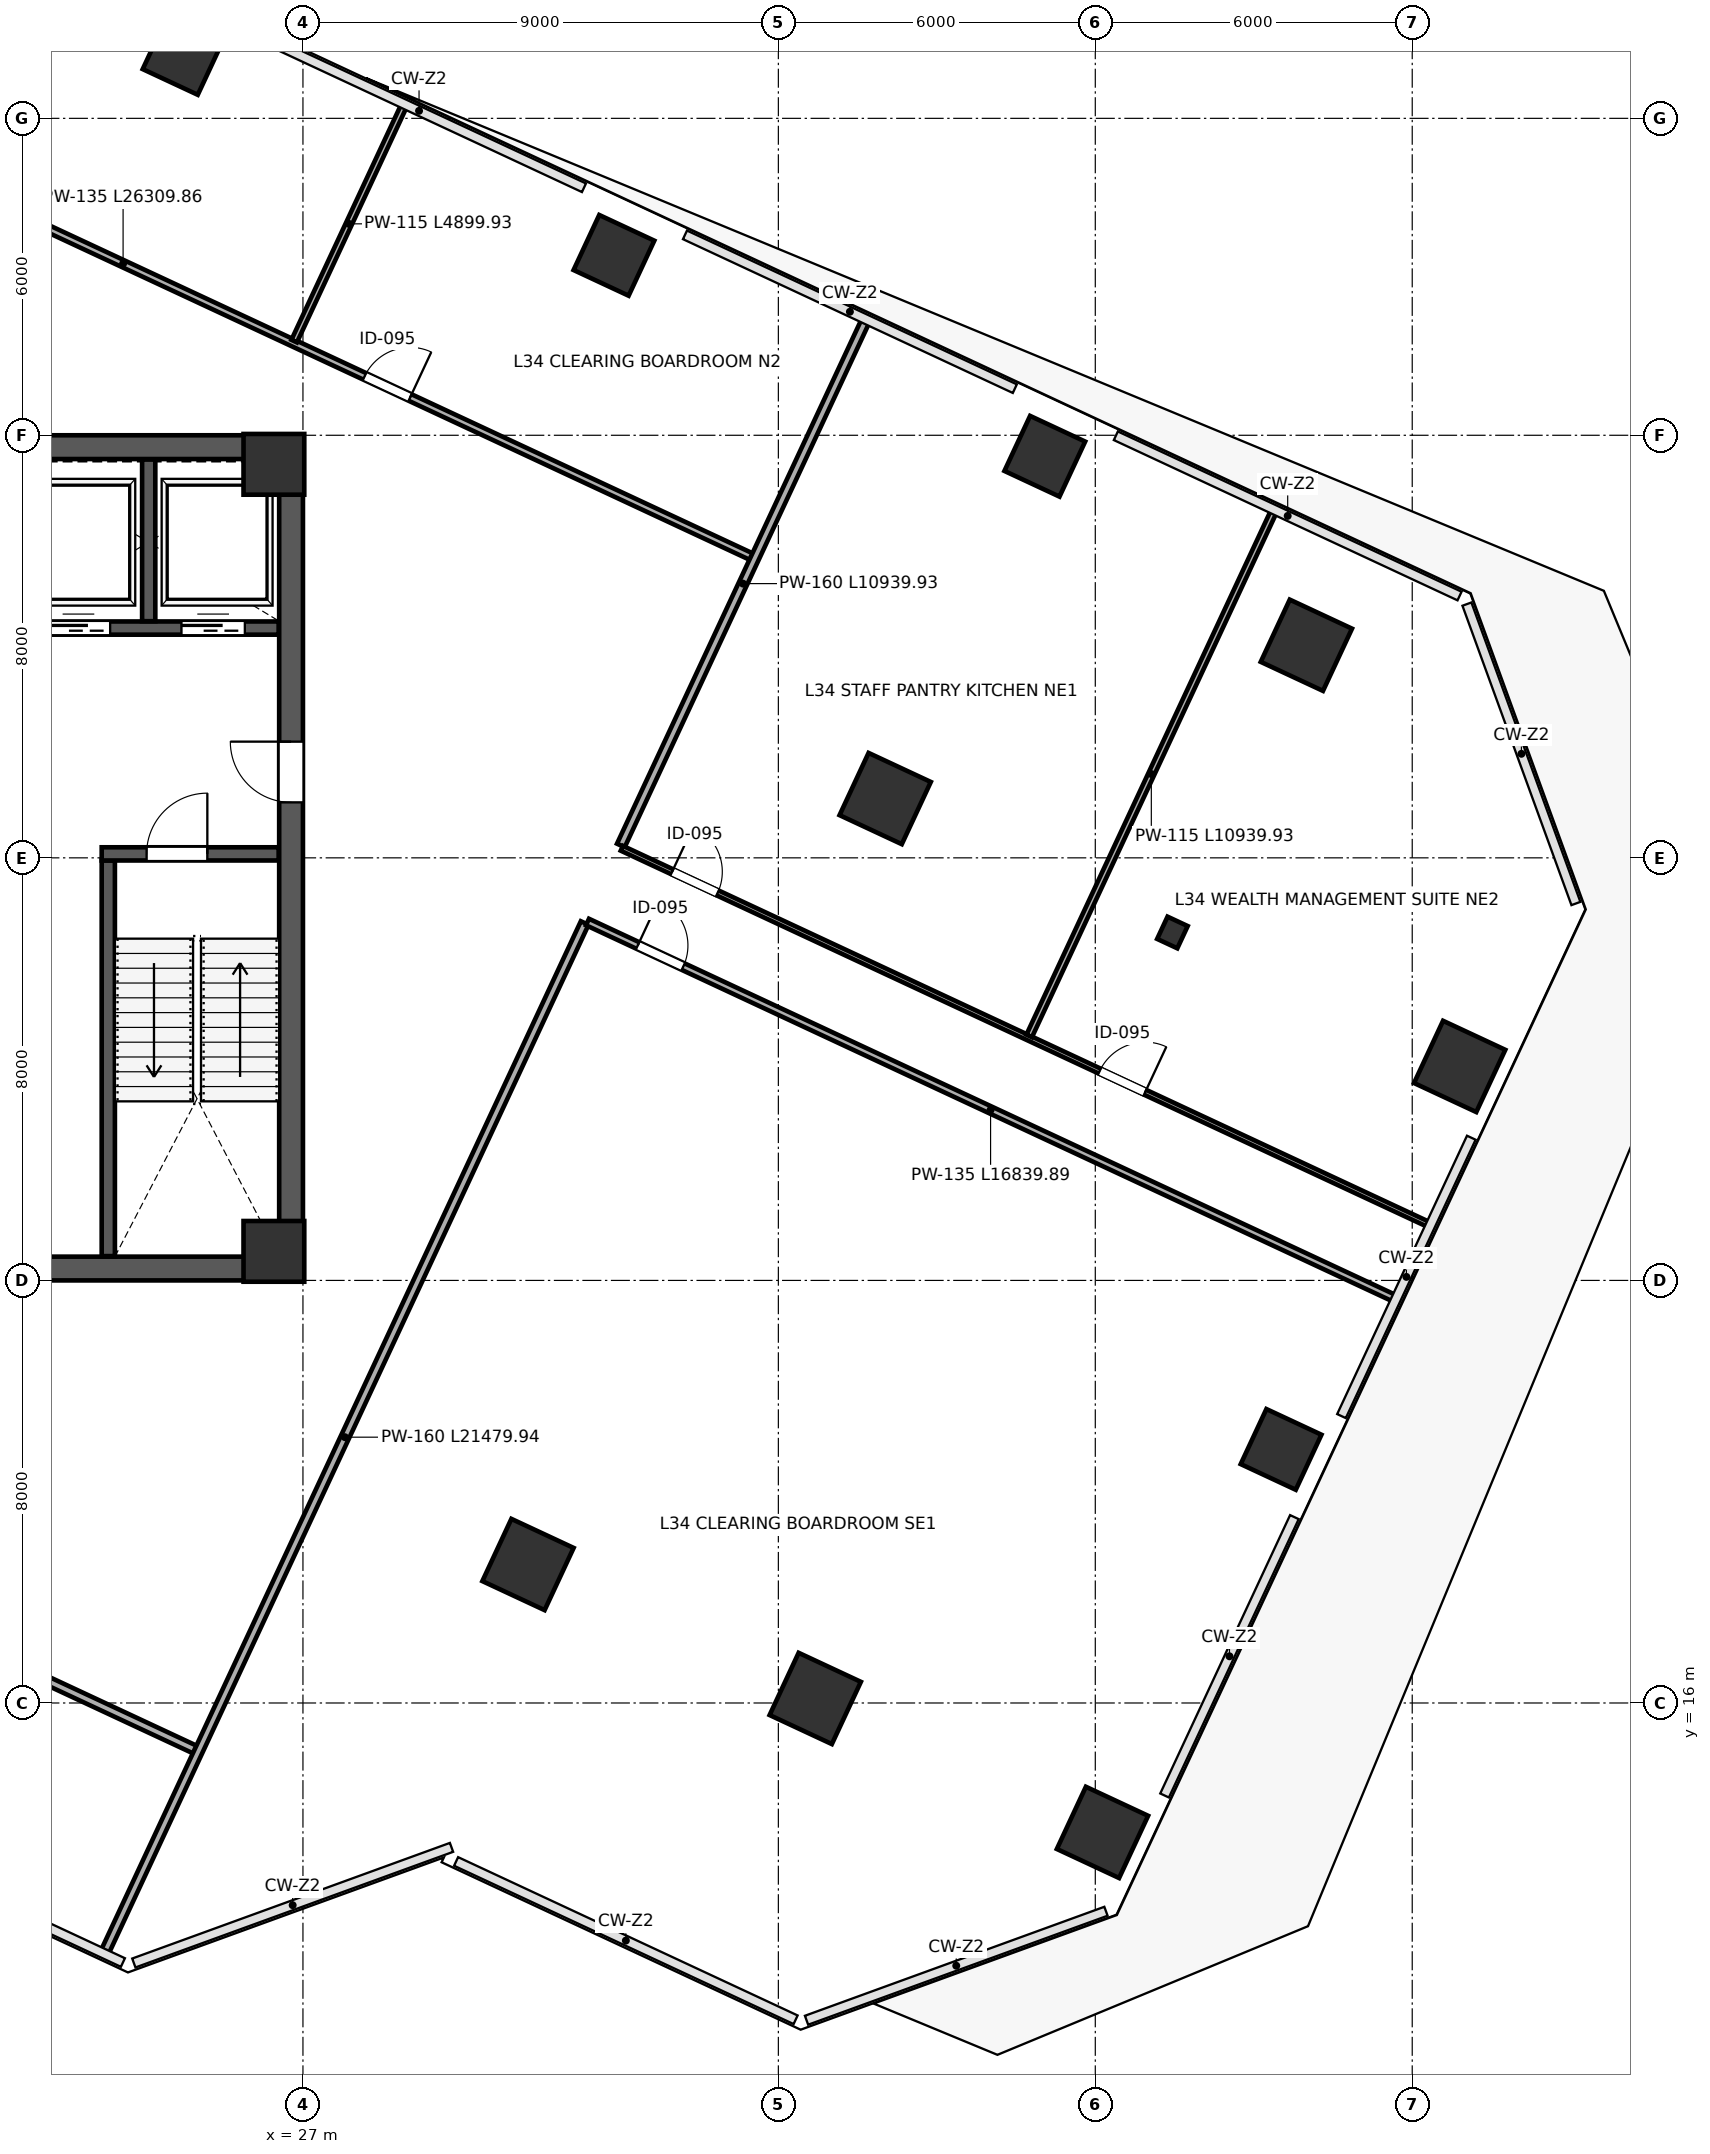
"""IFC4 building model, lengths in metres.
Left out: names, types, materials, properties, quantities, classifications, styles, units other than length and angle.
Written with IfcOpenShell. Run it as: python <this file> out.ifc"""

import sys

from ifc_helpers import new_model, si_unit, direction, frame, frame_2d, origin, origin_2d, place, context, subcontext, project, spatial, rectangle, i_section, extrude, source, transform, mapped, element, fill, save


model = new_model("IFC4")
c1 = context("Model", 3, precision=1e-05, world=origin(), true_north=direction((0.0, 1.0)))
c2 = subcontext(c1, "Body", "Model", "MODEL_VIEW")
j1 = project(units=[si_unit("LENGTHUNIT", "METRE"), si_unit("PLANEANGLEUNIT", "RADIAN")], contexts=[c1])
p1 = place(None, origin())
s1 = spatial("IfcSite", under=j1, at=p1, CompositionType="ELEMENT")
p2 = place(p1, origin())
s2 = spatial("IfcBuilding", under=s1, at=p2, CompositionType="ELEMENT")
p3 = place(p2, frame((0.0, 0.0, 154.0)))
s3 = spatial("IfcBuildingStorey", under=s2, at=p3, CompositionType="ELEMENT", Elevation=154.0)
m1 = source(origin(), c2, "Body", "SweptSolid", [
    extrude(rectangle(XDim=1.15, YDim=1.15, at=origin_2d()), origin(), (0.0, 0.0, 1.0), 4.198),
])
for number, where, z_axis, x_axis in (
    (1, (26.45, 24.55, 0.001), (0.0, 0.0, 1.0), (1.0, 0.0, 0.0)),
    (2, (26.45, 39.45, 0.001), (0.0, 0.0, 1.0), (1.0, 0.0, 0.0)),
):
    element("IfcColumn", number, at=place(p3, frame(where, z_axis=z_axis, x_axis=x_axis)), inside=s3, PredefinedType="COLUMN", context=c2, shape_type="MappedRepresentation", body=[
        mapped(m1, transform((0.0, 0.0, 0.0), scale=1.0)),
    ])
m2 = source(origin(), c2, "Body", "SweptSolid", [
    extrude(rectangle(XDim=1.15, YDim=1.15, at=origin_2d()), origin(), (0.0, 0.0, 1.0), 4.198),
])
for number, where, z_axis, x_axis in (
    (3, (24.731, 47.21, 0.001), (0.0, 0.0, 1.0), (-0.906, 0.423, 0.0)),
    (4, (32.887, 43.406, 0.001), (0.0, 0.0, 1.0), (-0.906, 0.423, 0.0)),
):
    element("IfcColumn", number, at=place(p3, frame(where, z_axis=z_axis, x_axis=x_axis)), inside=s3, PredefinedType="COLUMN", context=c2, shape_type="MappedRepresentation", body=[
        mapped(m2, transform((0.0, 0.0, 0.0), scale=1.0)),
    ])
m3 = source(origin(), c2, "Body", "SweptSolid", [
    extrude(rectangle(XDim=1.3, YDim=1.3, at=origin_2d()), origin(), (0.0, 0.0, 1.0), 4.198),
])
for number, where, z_axis, x_axis in (
    (5, (31.26, 18.622, 0.001), (0.0, 0.0, 1.0), (-0.906, 0.423, 0.0)),
    (6, (38.022, 33.123, 0.001), (0.0, 0.0, 1.0), (-0.906, 0.423, 0.0)),
):
    element("IfcColumn", number, at=place(p3, frame(where, z_axis=z_axis, x_axis=x_axis)), inside=s3, PredefinedType="COLUMN", context=c2, shape_type="MappedRepresentation", body=[
        mapped(m3, transform((0.0, 0.0, 0.0), scale=1.0)),
    ])
p4 = place(p3, frame((41.044, 39.603, 0.001), z_axis=(0.0, 0.0, 1.0), x_axis=(-0.906307787037, 0.422618261741, 0.0)))
e7 = element("IfcColumn", 7, at=p4, inside=s3, PredefinedType="COLUMN", context=c2, shape_type="MappedRepresentation", body=[
    mapped(m2, transform((0.0, 0.0, 0.0), scale=1.0)),
])
p5 = place(p3, frame((36.698, 16.086, 0.001), z_axis=(0.0, 0.0, 1.0), x_axis=(-0.906307787037, 0.422618261741, 0.0)))
e8 = element("IfcColumn", 8, at=p5, inside=s3, PredefinedType="COLUMN", context=c2, shape_type="MappedRepresentation", body=[
    mapped(m3, transform((0.0, 0.0, 0.0), scale=1.0)),
])
m4 = source(origin(), c2, "Body", "SweptSolid", [
    extrude(i_section(OverallWidth=0.421, OverallDepth=0.465, WebThickness=0.045, FlangeThickness=0.072, FilletRadius=0.015, at=origin_2d()), origin(), (0.0, 0.0, 1.0), 4.198),
])
p6 = place(p3, frame((43.46, 30.587, 0.001), z_axis=(0.0, 0.0, 1.0), x_axis=(-0.906307787037, 0.422618261741, 0.0)))
e9 = element("IfcColumn", 9, at=p6, inside=s3, PredefinedType="COLUMN", context=c2, shape_type="MappedRepresentation", body=[
    mapped(m4, transform((0.0, 0.0, 0.0), scale=1.0)),
])
p7 = place(p3, frame((45.996, 36.025, 0.001), z_axis=(0.0, 0.0, 1.0), x_axis=(-0.906307787037, 0.422618261741, 0.0)))
e10 = element("IfcColumn", 10, at=p7, inside=s3, PredefinedType="COLUMN", context=c2, shape_type="MappedRepresentation", body=[
    mapped(m3, transform((0.0, 0.0, 0.0), scale=1.0)),
])
m5 = source(origin(), c2, "Body", "SweptSolid", [
    extrude(rectangle(XDim=1.3, YDim=1.3, at=origin_2d()), origin(), (0.0, 0.0, 1.0), 4.198),
])
p8 = place(p3, frame((42.136, 13.55, 0.001), z_axis=(0.0, 0.0, 1.0), x_axis=(-0.906307787037, 0.422618261741, 0.0)))
e11 = element("IfcColumn", 11, at=p8, inside=s3, PredefinedType="COLUMN", context=c2, shape_type="MappedRepresentation", body=[
    mapped(m5, transform((0.0, 0.0, 0.0), scale=1.0)),
])
p9 = place(p3, frame((45.517, 20.801, 0.001), z_axis=(0.0, 0.0, 1.0), x_axis=(-0.906307787037, 0.422618261741, 0.0)))
e12 = element("IfcColumn", 12, at=p9, inside=s3, PredefinedType="COLUMN", context=c2, shape_type="MappedRepresentation", body=[
    mapped(m2, transform((0.0, 0.0, 0.0), scale=1.0)),
])
p10 = place(p3, frame((48.898, 28.051, 0.001), z_axis=(0.0, 0.0, 1.0), x_axis=(-0.906307787037, 0.422618261741, 0.0)))
e13 = element("IfcColumn", 13, at=p10, inside=s3, PredefinedType="COLUMN", context=c2, shape_type="MappedRepresentation", body=[
    mapped(m5, transform((0.0, 0.0, 0.0), scale=1.0)),
])
p11 = place(p3, frame((26.775, 24.45, 0.0), z_axis=(0.0, 0.0, 1.0), x_axis=(0.0, 1.0, 0.0)))
e14 = element("IfcWall", 14, at=p11, inside=s3, PredefinedType="SHEAR", context=c2, shape_type="SweptSolid", body=[
    extrude(rectangle(XDim=15.1, YDim=0.45, at=frame_2d((7.55, 0.0))), origin(), (0.0, 0.0, 1.0), 3.96),
])
p12 = place(p11, frame((8.6, 0.0, 0.0)))
e15 = element("IfcOpeningElement", 15, at=p12, cuts=e14, PredefinedType="OPENING", context=c2, shape_type="SweptSolid", body=[
    extrude(rectangle(XDim=1.15, YDim=2.2, at=frame_2d((0.575, 1.1))), frame((0.0, 0.235, 0.0), z_axis=(0.0, -1.0, 0.0), x_axis=(1.0, 0.0, 0.0)), (0.0, 0.0, 1.0), 0.47),
])
for number, where, z_axis, x_axis in (
    (16, (9.0, 24.225, 0.0), (0.0, 0.0, 1.0), (1.0, 0.0, 0.0)),
    (17, (9.0, 39.775, 0.0), (0.0, 0.0, 1.0), (1.0, 0.0, 0.0)),
):
    element("IfcWall", number, at=place(p3, frame(where, z_axis=z_axis, x_axis=x_axis)), inside=s3, PredefinedType="SHEAR", context=c2, shape_type="SweptSolid", body=[
        extrude(rectangle(XDim=18.0, YDim=0.45, at=frame_2d((9.0, 0.0))), origin(), (0.0, 0.0, 1.0), 3.96),
    ])
p13 = place(p3, frame((23.315, 24.46, 0.0), z_axis=(0.0, 0.0, 1.0), x_axis=(0.0, 1.0, 0.0)))
e18 = element("IfcWall", 18, at=p13, inside=s3, PredefinedType="SHEAR", context=c2, shape_type="SweptSolid", body=[
    extrude(rectangle(XDim=7.49, YDim=0.25, at=frame_2d((3.745, 0.0))), origin(), (0.0, 0.0, 1.0), 3.96),
])
p14 = place(p3, frame((23.19, 32.075, 0.0), z_axis=(0.0, 0.0, 1.0), x_axis=(1.0, 0.0, 0.0)))
e19 = element("IfcWall", 19, at=p14, inside=s3, PredefinedType="SHEAR", context=c2, shape_type="SweptSolid", body=[
    extrude(rectangle(XDim=3.35, YDim=0.25, at=frame_2d((1.675, 0.0))), origin(), (0.0, 0.0, 1.0), 3.96),
])
p15 = place(p14, frame((0.85, 0.0, 0.0)))
e20 = element("IfcOpeningElement", 20, at=p15, cuts=e19, PredefinedType="OPENING", context=c2, shape_type="SweptSolid", body=[
    extrude(rectangle(XDim=1.15, YDim=2.2, at=frame_2d((0.575, 1.1))), frame((0.0, 0.135, 0.0), z_axis=(0.0, -1.0, 0.0), x_axis=(1.0, 0.0, 0.0)), (0.0, 0.0, 1.0), 0.27),
])
p16 = place(p3, frame((21.45, 36.35, 0.0), z_axis=(0.0, 0.0, 1.0), x_axis=(1.0, 0.0, 0.0)))
e21 = element("IfcWall", 21, at=p16, inside=s3, PredefinedType="SHEAR", context=c2, shape_type="SweptSolid", body=[
    extrude(rectangle(XDim=5.09, YDim=0.25, at=frame_2d((2.545, 0.0))), origin(), (0.0, 0.0, 1.0), 3.96),
])
p17 = place(p16, frame((0.7, 0.0, 0.0)))
e22 = element("IfcOpeningElement", 22, at=p17, cuts=e21, PredefinedType="OPENING", context=c2, shape_type="SweptSolid", body=[
    extrude(rectangle(XDim=1.2, YDim=2.2, at=frame_2d((0.6, 1.1))), frame((0.0, 0.135, 0.0), z_axis=(0.0, -1.0, 0.0), x_axis=(1.0, 0.0, 0.0)), (0.0, 0.0, 1.0), 0.27),
])
p18 = place(p16, frame((3.25, 0.0, 0.0)))
e23 = element("IfcOpeningElement", 23, at=p18, cuts=e21, PredefinedType="OPENING", context=c2, shape_type="SweptSolid", body=[
    extrude(rectangle(XDim=1.2, YDim=2.2, at=frame_2d((0.6, 1.1))), frame((0.0, 0.135, 0.0), z_axis=(0.0, -1.0, 0.0), x_axis=(1.0, 0.0, 0.0)), (0.0, 0.0, 1.0), 0.27),
])
p19 = place(p3, frame((24.08, 36.48, 0.0), z_axis=(0.0, 0.0, 1.0), x_axis=(0.0, 1.0, 0.0)))
e24 = element("IfcWall", 24, at=p19, inside=s3, PredefinedType="SHEAR", context=c2, shape_type="SweptSolid", body=[
    extrude(rectangle(XDim=3.06, YDim=0.25, at=frame_2d((1.53, 0.0))), origin(), (0.0, 0.0, 1.0), 3.96),
])
p20 = place(p3, frame((7.213, 23.391, 0.0), z_axis=(0.0, 0.0, 1.0), x_axis=(0.906304602938, -0.422625089996, 0.0)))
e25 = element("IfcWall", 25, at=p20, inside=s3, PredefinedType="PARTITIONING", context=c2, shape_type="SweptSolid", body=[
    extrude(rectangle(XDim=19.61, YDim=0.16, at=frame_2d((9.805, 0.0))), origin(), (0.0, 0.0, 1.0), 3.96),
])
p21 = place(p20, frame((1.45, 0.0, 0.0)))
e26 = element("IfcOpeningElement", 26, at=p21, cuts=e25, PredefinedType="OPENING", context=c2, shape_type="SweptSolid", body=[
    extrude(rectangle(XDim=0.95, YDim=2.15, at=frame_2d((0.475, 1.075))), frame((0.0, 0.09, 0.0), z_axis=(0.0, -1.0, 0.0), x_axis=(1.0, 0.0, 0.0)), (0.0, 0.0, 1.0), 0.18),
])
p22 = place(p20, frame((8.7, 0.0, 0.0)))
e27 = element("IfcOpeningElement", 27, at=p22, cuts=e25, PredefinedType="OPENING", context=c2, shape_type="SweptSolid", body=[
    extrude(rectangle(XDim=0.95, YDim=2.15, at=frame_2d((0.475, 1.075))), frame((0.0, 0.09, 0.0), z_axis=(0.0, -1.0, 0.0), x_axis=(1.0, 0.0, 0.0)), (0.0, 0.0, 1.0), 0.18),
])
p23 = place(p3, frame((11.673, 48.808, 0.0), z_axis=(0.0, 0.0, 1.0), x_axis=(0.906307085664, -0.422619765836, 0.0)))
e28 = element("IfcWall", 28, at=p23, inside=s3, PredefinedType="PARTITIONING", context=c2, shape_type="SweptSolid", body=[
    extrude(rectangle(XDim=26.31, YDim=0.135, at=frame_2d((13.155, 0.0))), origin(), (0.0, 0.0, 1.0), 3.96),
])
p24 = place(p23, frame((2.1, 0.0, 0.0)))
e29 = element("IfcOpeningElement", 29, at=p24, cuts=e28, PredefinedType="OPENING", context=c2, shape_type="SweptSolid", body=[
    extrude(rectangle(XDim=0.95, YDim=2.15, at=frame_2d((0.475, 1.075))), frame((0.0, 0.078, 0.0), z_axis=(0.0, -1.0, 0.0), x_axis=(1.0, 0.0, 0.0)), (0.0, 0.0, 1.0), 0.155),
])
p25 = place(p23, frame((18.2, 0.0, 0.0)))
e30 = element("IfcOpeningElement", 30, at=p25, cuts=e28, PredefinedType="OPENING", context=c2, shape_type="SweptSolid", body=[
    extrude(rectangle(XDim=0.95, YDim=2.15, at=frame_2d((0.475, 1.075))), frame((0.0, 0.078, 0.0), z_axis=(0.0, -1.0, 0.0), x_axis=(1.0, 0.0, 0.0)), (0.0, 0.0, 1.0), 0.155),
])
p26 = place(p3, frame((26.834, 41.782, 0.0), z_axis=(0.0, 0.0, 1.0), x_axis=(0.422631768009, 0.906301488838, 0.0)))
e31 = element("IfcWall", 31, at=p26, inside=s3, PredefinedType="PARTITIONING", context=c2, shape_type="SweptSolid", body=[
    extrude(rectangle(XDim=4.9, YDim=0.115, at=frame_2d((2.45, 0.0))), origin(), (0.0, 0.0, 1.0), 3.195),
])
p27 = place(p3, frame((33.018, 32.234, 0.0), z_axis=(0.0, 0.0, 1.0), x_axis=(0.422624006235, 0.906305108313, 0.0)))
e32 = element("IfcWall", 32, at=p27, inside=s3, PredefinedType="PARTITIONING", context=c2, shape_type="SweptSolid", body=[
    extrude(rectangle(XDim=10.94, YDim=0.16, at=frame_2d((5.47, 0.0))), origin(), (0.0, 0.0, 1.0), 3.195),
])
p28 = place(p3, frame((23.256, 11.299, 0.0), z_axis=(0.0, 0.0, 1.0), x_axis=(0.422623489462, 0.906305349292, 0.0)))
e33 = element("IfcWall", 33, at=p28, inside=s3, PredefinedType="PARTITIONING", context=c2, shape_type="SweptSolid", body=[
    extrude(rectangle(XDim=21.48, YDim=0.16, at=frame_2d((10.74, 0.0))), origin(), (0.0, 0.0, 1.0), 3.96),
])
p29 = place(p3, frame((33.038, 32.181, 0.0), z_axis=(0.0, 0.0, 1.0), x_axis=(0.906309400931, -0.422614800716, 0.0)))
e34 = element("IfcWall", 34, at=p29, inside=s3, PredefinedType="PARTITIONING", context=c2, shape_type="SweptSolid", body=[
    extrude(rectangle(XDim=16.84, YDim=0.1, at=frame_2d((8.42, 0.0))), origin(), (0.0, 0.0, 1.0), 3.96),
])
p30 = place(p29, frame((1.05, 0.0, 0.0)))
e35 = element("IfcOpeningElement", 35, at=p30, cuts=e34, PredefinedType="OPENING", context=c2, shape_type="SweptSolid", body=[
    extrude(rectangle(XDim=0.95, YDim=2.15, at=frame_2d((0.475, 1.075))), frame((0.0, 0.06, 0.0), z_axis=(0.0, -1.0, 0.0), x_axis=(1.0, 0.0, 0.0)), (0.0, 0.0, 1.0), 0.12),
])
p31 = place(p29, frame((9.98, 0.0, 0.0)))
e36 = element("IfcOpeningElement", 36, at=p31, cuts=e34, PredefinedType="OPENING", context=c2, shape_type="SweptSolid", body=[
    extrude(rectangle(XDim=0.95, YDim=2.15, at=frame_2d((0.475, 1.075))), frame((0.0, 0.06, 0.0), z_axis=(0.0, -1.0, 0.0), x_axis=(1.0, 0.0, 0.0)), (0.0, 0.0, 1.0), 0.12),
])
p32 = place(p3, frame((32.387, 30.785, 0.0), z_axis=(0.0, 0.0, 1.0), x_axis=(0.906303847891, -0.422626709163, 0.0)))
e37 = element("IfcWall", 37, at=p32, inside=s3, PredefinedType="PARTITIONING", context=c2, shape_type="SweptSolid", body=[
    extrude(rectangle(XDim=16.84, YDim=0.135, at=frame_2d((8.42, 0.0))), origin(), (0.0, 0.0, 1.0), 3.96),
])
p33 = place(p32, frame((1.05, 0.0, 0.0)))
e38 = element("IfcOpeningElement", 38, at=p33, cuts=e37, PredefinedType="OPENING", context=c2, shape_type="SweptSolid", body=[
    extrude(rectangle(XDim=0.95, YDim=2.15, at=frame_2d((0.475, 1.075))), frame((0.0, 0.078, 0.0), z_axis=(0.0, -1.0, 0.0), x_axis=(1.0, 0.0, 0.0)), (0.0, 0.0, 1.0), 0.155),
])
p34 = place(p3, frame((40.749, 28.629, 0.0), z_axis=(0.0, 0.0, 1.0), x_axis=(0.422632554077, 0.906301122274, 0.0)))
e39 = element("IfcWall", 39, at=p34, inside=s3, PredefinedType="PARTITIONING", context=c2, shape_type="SweptSolid", body=[
    extrude(rectangle(XDim=10.94, YDim=0.115, at=frame_2d((5.47, 0.0))), origin(), (0.0, 0.0, 1.0), 3.96),
])
m6 = source(origin(), c2, "Body", "SweptSolid", [
    extrude(rectangle(XDim=1.15, YDim=2.2, at=frame_2d((0.575, 1.1))), frame((0.0, 0.025, 0.0), z_axis=(0.0, -1.0, 0.0), x_axis=(1.0, 0.0, 0.0)), (0.0, 0.0, 1.0), 0.05),
])
p35 = place(p15, origin())
e40 = element("IfcDoor", 40, at=p35, inside=s3, OperationType="SINGLE_SWING_RIGHT", PredefinedType="DOOR", context=c2, shape_type="MappedRepresentation", body=[
    mapped(m6, transform((0.0, 0.0, 0.0), scale=1.0)),
])
fill(e20, e40)
m7 = source(origin(), c2, "Body", "SweptSolid", [
    extrude(rectangle(XDim=1.15, YDim=2.2, at=frame_2d((0.575, 1.1))), frame((0.0, 0.025, 0.0), z_axis=(0.0, -1.0, 0.0), x_axis=(1.0, 0.0, 0.0)), (0.0, 0.0, 1.0), 0.05),
])
p36 = place(p12, origin())
e41 = element("IfcDoor", 41, at=p36, inside=s3, OperationType="SINGLE_SWING_RIGHT", PredefinedType="DOOR", context=c2, shape_type="MappedRepresentation", body=[
    mapped(m7, transform((0.0, 0.0, 0.0), scale=1.0)),
])
fill(e15, e41)
m8 = source(origin(), c2, "Body", "SweptSolid", [
    extrude(rectangle(XDim=1.2, YDim=2.2, at=frame_2d((0.6, 1.1))), frame((0.0, 0.025, 0.0), z_axis=(0.0, -1.0, 0.0), x_axis=(1.0, 0.0, 0.0)), (0.0, 0.0, 1.0), 0.05),
])
p37 = place(p17, origin())
e42 = element("IfcDoor", 42, at=p37, inside=s3, OperationType="SLIDING_TO_LEFT", PredefinedType="DOOR", context=c2, shape_type="MappedRepresentation", body=[
    mapped(m8, transform((0.0, 0.0, 0.0), scale=1.0)),
])
fill(e22, e42)
p38 = place(p18, origin())
e43 = element("IfcDoor", 43, at=p38, inside=s3, OperationType="SLIDING_TO_RIGHT", PredefinedType="DOOR", context=c2, shape_type="MappedRepresentation", body=[
    mapped(m8, transform((0.0, 0.0, 0.0), scale=1.0)),
])
fill(e23, e43)
m9 = source(origin(), c2, "Body", "SweptSolid", [
    extrude(rectangle(XDim=0.95, YDim=2.15, at=frame_2d((0.475, 1.075))), frame((0.0, 0.025, 0.0), z_axis=(0.0, -1.0, 0.0), x_axis=(1.0, 0.0, 0.0)), (0.0, 0.0, 1.0), 0.05),
])
p39 = place(p25, origin())
e44 = element("IfcDoor", 44, at=p39, inside=s3, OperationType="SINGLE_SWING_RIGHT", PredefinedType="DOOR", context=c2, shape_type="MappedRepresentation", body=[
    mapped(m9, transform((0.0, 0.0, 0.0), scale=1.0)),
])
fill(e30, e44)
p40 = place(p30, origin())
e45 = element("IfcDoor", 45, at=p40, inside=s3, OperationType="SINGLE_SWING_LEFT", PredefinedType="DOOR", context=c2, shape_type="MappedRepresentation", body=[
    mapped(m9, transform((0.0, 0.0, 0.0), scale=1.0)),
])
fill(e35, e45)
p41 = place(p31, origin())
e46 = element("IfcDoor", 46, at=p41, inside=s3, OperationType="SINGLE_SWING_RIGHT", PredefinedType="DOOR", context=c2, shape_type="MappedRepresentation", body=[
    mapped(m9, transform((0.0, 0.0, 0.0), scale=1.0)),
])
fill(e36, e46)
p42 = place(p33, origin())
e47 = element("IfcDoor", 47, at=p42, inside=s3, OperationType="SINGLE_SWING_LEFT", PredefinedType="DOOR", context=c2, shape_type="MappedRepresentation", body=[
    mapped(m9, transform((0.0, 0.0, 0.0), scale=1.0)),
])
fill(e38, e47)
save(model, sys.argv[1])
